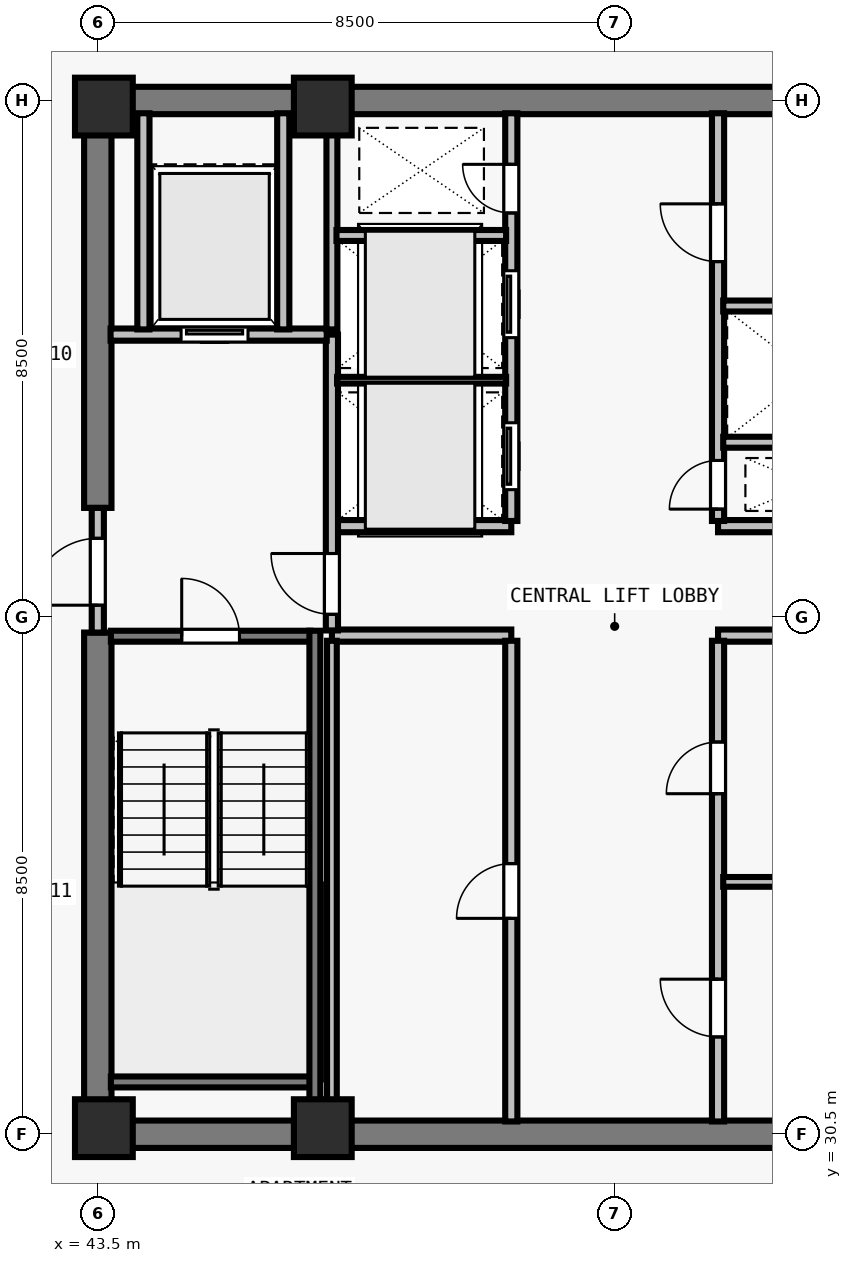
"""IFC4 building model, lengths in metres.
Left out: names, types, materials, properties, quantities, classifications, styles, units other than length and angle.
Written with IfcOpenShell. Run it as: python <this file> out.ifc"""

import sys

from ifc_helpers import new_model, si_unit, direction, frame, frame_2d, origin, origin_2d, place, context, subcontext, project, spatial, rectangle, extrude, element, fill, save


model = new_model("IFC4")
c1 = context("Model", 3, precision=1e-05, world=origin(), true_north=direction((0.0, 1.0)))
c2 = subcontext(c1, "Body", "Model", "MODEL_VIEW")
j1 = project(units=[si_unit("LENGTHUNIT", "METRE"), si_unit("PLANEANGLEUNIT", "RADIAN")], contexts=[c1])
p1 = place(None, origin())
s1 = spatial("IfcSite", under=j1, at=p1, CompositionType="ELEMENT")
p2 = place(p1, origin())
s2 = spatial("IfcBuilding", under=s1, at=p2, CompositionType="ELEMENT")
p3 = place(p2, frame((0.0, 0.0, 220.0)))
s3 = spatial("IfcBuildingStorey", under=s2, at=p3, CompositionType="ELEMENT", Elevation=220.0)
for number, where, z_axis, x_axis in (
    (1, (43.6, 30.6, 0.0), (0.0, 0.0, 1.0), (1.0, 0.0, 0.0)),
    (2, (47.2, 30.6, 0.0), (0.0, 0.0, 1.0), (1.0, 0.0, 0.0)),
    (3, (43.6, 47.4, 0.0), (0.0, 0.0, 1.0), (1.0, 0.0, 0.0)),
    (4, (47.2, 47.4, 0.0), (0.0, 0.0, 1.0), (1.0, 0.0, 0.0)),
):
    element("IfcColumn", number, at=place(p3, frame(where, z_axis=z_axis, x_axis=x_axis)), inside=s3, PredefinedType="COLUMN", context=c2, shape_type="SweptSolid", body=[
        extrude(rectangle(XDim=0.95, YDim=0.95, at=origin_2d()), origin(), (0.0, 0.0, 1.0), 3.5),
    ])
for number, where, z_axis, x_axis in (
    (5, (43.275, 30.5, 0.0), (0.0, 0.0, 1.0), (1.0, 0.0, 0.0)),
    (6, (43.275, 47.5, 0.0), (0.0, 0.0, 1.0), (1.0, 0.0, 0.0)),
):
    element("IfcWall", number, at=place(p3, frame(where, z_axis=z_axis, x_axis=x_axis)), inside=s3, PredefinedType="SHEAR", context=c2, shape_type="SweptSolid", body=[
        extrude(rectangle(XDim=17.45, YDim=0.45, at=frame_2d((8.725, 0.0))), origin(), (0.0, 0.0, 1.0), 3.29),
    ])
p4 = place(p3, frame((43.5, 30.715, 0.0), z_axis=(0.0, 0.0, 1.0), x_axis=(0.0, 1.0, 0.0)))
e7 = element("IfcWall", 7, at=p4, inside=s3, PredefinedType="SHEAR", context=c2, shape_type="SweptSolid", body=[
    extrude(rectangle(XDim=8.035, YDim=0.45, at=frame_2d((4.018, 0.0))), origin(), (0.0, 0.0, 1.0), 3.29),
])
p5 = place(p3, frame((43.5, 40.8, 0.0), z_axis=(0.0, 0.0, 1.0), x_axis=(0.0, 1.0, 0.0)))
e8 = element("IfcWall", 8, at=p5, inside=s3, PredefinedType="SHEAR", context=c2, shape_type="SweptSolid", body=[
    extrude(rectangle(XDim=6.485, YDim=0.45, at=frame_2d((3.242, 0.0))), origin(), (0.0, 0.0, 1.0), 3.29),
])
for number, where, z_axis, x_axis in (
    (9, (47.35, 38.7, 0.0), (0.0, 0.0, 1.0), (1.0, 0.0, 0.0)),
    (10, (47.35, 40.5, 0.0), (0.0, 0.0, 1.0), (1.0, 0.0, 0.0)),
    (11, (53.7, 38.7, 0.0), (0.0, 0.0, 1.0), (1.0, 0.0, 0.0)),
    (12, (53.7, 40.5, 0.0), (0.0, 0.0, 1.0), (1.0, 0.0, 0.0)),
):
    element("IfcWall", number, at=place(p3, frame(where, z_axis=z_axis, x_axis=x_axis)), inside=s3, PredefinedType="SOLIDWALL", context=c2, shape_type="SweptSolid", body=[
        extrude(rectangle(XDim=2.95, YDim=0.2, at=frame_2d((1.475, 0.0))), origin(), (0.0, 0.0, 1.0), 3.29),
    ])
p6 = place(p3, frame((50.3, 30.71, 0.0), z_axis=(0.0, 0.0, 1.0), x_axis=(0.0, 1.0, 0.0)))
e13 = element("IfcWall", 13, at=p6, inside=s3, PredefinedType="SOLIDWALL", context=c2, shape_type="SweptSolid", body=[
    extrude(rectangle(XDim=7.905, YDim=0.2, at=frame_2d((3.953, 0.0))), origin(), (0.0, 0.0, 1.0), 3.29),
])
p7 = place(p6, frame((3.34, 0.0, 0.0)))
e14 = element("IfcOpeningElement", 14, at=p7, cuts=e13, PredefinedType="OPENING", context=c2, shape_type="SweptSolid", body=[
    extrude(rectangle(XDim=0.9, YDim=2.12, at=frame_2d((0.45, 1.06))), frame((0.0, 0.11, 0.0), z_axis=(0.0, -1.0, 0.0), x_axis=(1.0, 0.0, 0.0)), (0.0, 0.0, 1.0), 0.22),
])
p8 = place(p3, frame((53.7, 30.71, 0.0), z_axis=(0.0, 0.0, 1.0), x_axis=(0.0, 1.0, 0.0)))
e15 = element("IfcWall", 15, at=p8, inside=s3, PredefinedType="SOLIDWALL", context=c2, shape_type="SweptSolid", body=[
    extrude(rectangle(XDim=7.905, YDim=0.2, at=frame_2d((3.953, 0.0))), origin(), (0.0, 0.0, 1.0), 3.29),
])
p9 = place(p8, frame((1.39, 0.0, 0.0)))
e16 = element("IfcOpeningElement", 16, at=p9, cuts=e15, PredefinedType="OPENING", context=c2, shape_type="SweptSolid", body=[
    extrude(rectangle(XDim=0.95, YDim=2.12, at=frame_2d((0.475, 1.06))), frame((0.0, 0.11, 0.0), z_axis=(0.0, -1.0, 0.0), x_axis=(1.0, 0.0, 0.0)), (0.0, 0.0, 1.0), 0.22),
])
p10 = place(p8, frame((5.39, 0.0, 0.0)))
e17 = element("IfcOpeningElement", 17, at=p10, cuts=e15, PredefinedType="OPENING", context=c2, shape_type="SweptSolid", body=[
    extrude(rectangle(XDim=0.85, YDim=2.12, at=frame_2d((0.425, 1.06))), frame((0.0, 0.11, 0.0), z_axis=(0.0, -1.0, 0.0), x_axis=(1.0, 0.0, 0.0)), (0.0, 0.0, 1.0), 0.22),
])
p11 = place(p3, frame((50.3, 40.585, 0.0), z_axis=(0.0, 0.0, 1.0), x_axis=(0.0, 1.0, 0.0)))
e18 = element("IfcWall", 18, at=p11, inside=s3, PredefinedType="SOLIDWALL", context=c2, shape_type="SweptSolid", body=[
    extrude(rectangle(XDim=6.705, YDim=0.2, at=frame_2d((3.353, 0.0))), origin(), (0.0, 0.0, 1.0), 3.29),
])
p12 = place(p11, frame((0.515, 0.0, 0.0)))
e19 = element("IfcOpeningElement", 19, at=p12, cuts=e18, PredefinedType="OPENING", context=c2, shape_type="SweptSolid", body=[
    extrude(rectangle(XDim=1.1, YDim=2.2, at=frame_2d((0.55, 1.1))), frame((0.0, 0.11, 0.0), z_axis=(0.0, -1.0, 0.0), x_axis=(1.0, 0.0, 0.0)), (0.0, 0.0, 1.0), 0.22),
])
p13 = place(p11, frame((3.015, 0.0, 0.0)))
e20 = element("IfcOpeningElement", 20, at=p13, cuts=e18, PredefinedType="OPENING", context=c2, shape_type="SweptSolid", body=[
    extrude(rectangle(XDim=1.1, YDim=2.2, at=frame_2d((0.55, 1.1))), frame((0.0, 0.11, 0.0), z_axis=(0.0, -1.0, 0.0), x_axis=(1.0, 0.0, 0.0)), (0.0, 0.0, 1.0), 0.22),
])
p14 = place(p11, frame((5.065, 0.0, 0.0)))
e21 = element("IfcOpeningElement", 21, at=p14, cuts=e18, PredefinedType="OPENING", context=c2, shape_type="SweptSolid", body=[
    extrude(rectangle(XDim=0.8, YDim=2.08, at=frame_2d((0.4, 1.04))), frame((0.0, 0.11, 0.0), z_axis=(0.0, -1.0, 0.0), x_axis=(1.0, 0.0, 0.0)), (0.0, 0.0, 1.0), 0.22),
])
p15 = place(p3, frame((53.7, 40.585, 0.0), z_axis=(0.0, 0.0, 1.0), x_axis=(0.0, 1.0, 0.0)))
e22 = element("IfcWall", 22, at=p15, inside=s3, PredefinedType="SOLIDWALL", context=c2, shape_type="SweptSolid", body=[
    extrude(rectangle(XDim=6.705, YDim=0.2, at=frame_2d((3.353, 0.0))), origin(), (0.0, 0.0, 1.0), 3.29),
])
p16 = place(p15, frame((0.195, 0.0, 0.0)))
e23 = element("IfcOpeningElement", 23, at=p16, cuts=e22, PredefinedType="OPENING", context=c2, shape_type="SweptSolid", body=[
    extrude(rectangle(XDim=0.8, YDim=2.08, at=frame_2d((0.4, 1.04))), frame((0.0, 0.11, 0.0), z_axis=(0.0, -1.0, 0.0), x_axis=(1.0, 0.0, 0.0)), (0.0, 0.0, 1.0), 0.22),
])
p17 = place(p15, frame((4.265, 0.0, 0.0)))
e24 = element("IfcOpeningElement", 24, at=p17, cuts=e22, PredefinedType="OPENING", context=c2, shape_type="SweptSolid", body=[
    extrude(rectangle(XDim=0.95, YDim=2.12, at=frame_2d((0.475, 1.06))), frame((0.0, 0.11, 0.0), z_axis=(0.0, -1.0, 0.0), x_axis=(1.0, 0.0, 0.0)), (0.0, 0.0, 1.0), 0.22),
])
p18 = place(p3, frame((43.5, 38.75, 0.0), z_axis=(0.0, 0.0, 1.0), x_axis=(0.0, 1.0, 0.0)))
e25 = element("IfcWall", 25, at=p18, inside=s3, PredefinedType="SOLIDWALL", context=c2, shape_type="SweptSolid", body=[
    extrude(rectangle(XDim=2.05, YDim=0.2, at=frame_2d((1.025, 0.0))), origin(), (0.0, 0.0, 1.0), 3.29),
])
p19 = place(p18, frame((0.45, 0.0, 0.0)))
e26 = element("IfcOpeningElement", 26, at=p19, cuts=e25, PredefinedType="OPENING", context=c2, shape_type="SweptSolid", body=[
    extrude(rectangle(XDim=1.1, YDim=2.15, at=frame_2d((0.55, 1.075))), frame((0.0, 0.11, 0.0), z_axis=(0.0, -1.0, 0.0), x_axis=(1.0, 0.0, 0.0)), (0.0, 0.0, 1.0), 0.22),
])
p20 = place(p3, frame((47.35, 38.785, 0.0), z_axis=(0.0, 0.0, 1.0), x_axis=(0.0, 1.0, 0.0)))
e27 = element("IfcWall", 27, at=p20, inside=s3, PredefinedType="SOLIDWALL", context=c2, shape_type="SweptSolid", body=[
    extrude(rectangle(XDim=4.865, YDim=0.2, at=frame_2d((2.433, 0.0))), origin(), (0.0, 0.0, 1.0), 3.29),
])
p21 = place(p20, frame((0.265, 0.0, 0.0)))
e28 = element("IfcOpeningElement", 28, at=p21, cuts=e27, PredefinedType="OPENING", context=c2, shape_type="SweptSolid", body=[
    extrude(rectangle(XDim=1.0, YDim=2.15, at=frame_2d((0.5, 1.075))), frame((0.0, 0.11, 0.0), z_axis=(0.0, -1.0, 0.0), x_axis=(1.0, 0.0, 0.0)), (0.0, 0.0, 1.0), 0.22),
])
p22 = place(p3, frame((43.71, 43.65, 0.0), z_axis=(0.0, 0.0, 1.0), x_axis=(1.0, 0.0, 0.0)))
e29 = element("IfcWall", 29, at=p22, inside=s3, PredefinedType="SOLIDWALL", context=c2, shape_type="SweptSolid", body=[
    extrude(rectangle(XDim=3.555, YDim=0.2, at=frame_2d((1.777, 0.0))), origin(), (0.0, 0.0, 1.0), 3.29),
])
p23 = place(p22, frame((1.16, 0.0, 0.0)))
e30 = element("IfcOpeningElement", 30, at=p23, cuts=e29, PredefinedType="OPENING", context=c2, shape_type="SweptSolid", body=[
    extrude(rectangle(XDim=1.1, YDim=2.2, at=frame_2d((0.55, 1.1))), frame((0.0, 0.11, 0.0), z_axis=(0.0, -1.0, 0.0), x_axis=(1.0, 0.0, 0.0)), (0.0, 0.0, 1.0), 0.22),
])
for number, where, z_axis, x_axis in (
    (31, (46.55, 43.735, 0.0), (0.0, 0.0, 1.0), (0.0, 1.0, 0.0)),
    (32, (44.25, 43.735, 0.0), (0.0, 0.0, 1.0), (0.0, 1.0, 0.0)),
):
    element("IfcWall", number, at=place(p3, frame(where, z_axis=z_axis, x_axis=x_axis)), inside=s3, PredefinedType="SOLIDWALL", context=c2, shape_type="SweptSolid", body=[
        extrude(rectangle(XDim=3.555, YDim=0.2, at=frame_2d((1.777, 0.0))), origin(), (0.0, 0.0, 1.0), 3.29),
    ])
p24 = place(p3, frame((47.35, 30.71, 0.0), z_axis=(0.0, 0.0, 1.0), x_axis=(0.0, 1.0, 0.0)))
e33 = element("IfcWall", 33, at=p24, inside=s3, PredefinedType="PARTITIONING", context=c2, shape_type="SweptSolid", body=[
    extrude(rectangle(XDim=7.905, YDim=0.16, at=frame_2d((3.953, 0.0))), origin(), (0.0, 0.0, 1.0), 3.29),
])
p25 = place(p3, frame((53.785, 34.65, 0.0), z_axis=(0.0, 0.0, 1.0), x_axis=(1.0, 0.0, 0.0)))
e34 = element("IfcWall", 34, at=p25, inside=s3, PredefinedType="PARTITIONING", context=c2, shape_type="SweptSolid", body=[
    extrude(rectangle(XDim=2.8, YDim=0.16, at=frame_2d((1.4, 0.0))), origin(), (0.0, 0.0, 1.0), 3.29),
])
p26 = place(p3, frame((47.35, 43.735, 0.0), z_axis=(0.0, 0.0, 1.0), x_axis=(0.0, 1.0, 0.0)))
e35 = element("IfcWall", 35, at=p26, inside=s3, PredefinedType="SOLIDWALL", context=c2, shape_type="SweptSolid", body=[
    extrude(rectangle(XDim=3.555, YDim=0.18, at=frame_2d((1.777, 0.0))), origin(), (0.0, 0.0, 1.0), 3.29),
])
p27 = place(p3, frame((47.435, 42.9, 0.0), z_axis=(0.0, 0.0, 1.0), x_axis=(1.0, 0.0, 0.0)))
e36 = element("IfcWall", 36, at=p27, inside=s3, PredefinedType="PARTITIONING", context=c2, shape_type="SweptSolid", body=[
    extrude(rectangle(XDim=2.78, YDim=0.11, at=frame_2d((1.39, 0.0))), origin(), (0.0, 0.0, 1.0), 3.29),
])
p28 = place(p3, frame((47.425, 45.28, 0.0), z_axis=(0.0, 0.0, 1.0), x_axis=(1.0, 0.0, 0.0)))
e37 = element("IfcWall", 37, at=p28, inside=s3, PredefinedType="SOLIDWALL", context=c2, shape_type="SweptSolid", body=[
    extrude(rectangle(XDim=2.79, YDim=0.18, at=frame_2d((1.395, 0.0))), origin(), (0.0, 0.0, 1.0), 3.29),
])
p29 = place(p3, frame((53.785, 41.88, 0.0), z_axis=(0.0, 0.0, 1.0), x_axis=(1.0, 0.0, 0.0)))
e38 = element("IfcWall", 38, at=p29, inside=s3, PredefinedType="SOLIDWALL", context=c2, shape_type="SweptSolid", body=[
    extrude(rectangle(XDim=2.78, YDim=0.18, at=frame_2d((1.39, 0.0))), origin(), (0.0, 0.0, 1.0), 3.29),
])
p30 = place(p3, frame((53.785, 44.12, 0.0), z_axis=(0.0, 0.0, 1.0), x_axis=(1.0, 0.0, 0.0)))
e39 = element("IfcWall", 39, at=p30, inside=s3, PredefinedType="SOLIDWALL", context=c2, shape_type="SweptSolid", body=[
    extrude(rectangle(XDim=2.79, YDim=0.18, at=frame_2d((1.395, 0.0))), origin(), (0.0, 0.0, 1.0), 3.29),
])
p31 = place(p3, frame((43.715, 38.69, 0.0), z_axis=(0.0, 0.0, 1.0), x_axis=(1.0, 0.0, 0.0)))
e40 = element("IfcWall", 40, at=p31, inside=s3, PredefinedType="SOLIDWALL", context=c2, shape_type="SweptSolid", body=[
    extrude(rectangle(XDim=3.28, YDim=0.18, at=frame_2d((1.64, 0.0))), origin(), (0.0, 0.0, 1.0), 3.29),
])
p32 = place(p31, frame((1.165, 0.0, 0.0)))
e41 = element("IfcOpeningElement", 41, at=p32, cuts=e40, PredefinedType="OPENING", context=c2, shape_type="SweptSolid", body=[
    extrude(rectangle(XDim=0.95, YDim=2.15, at=frame_2d((0.475, 1.075))), frame((0.0, 0.1, 0.0), z_axis=(0.0, -1.0, 0.0), x_axis=(1.0, 0.0, 0.0)), (0.0, 0.0, 1.0), 0.2),
])
p33 = place(p3, frame((43.715, 31.36, 0.0), z_axis=(0.0, 0.0, 1.0), x_axis=(1.0, 0.0, 0.0)))
e42 = element("IfcWall", 42, at=p33, inside=s3, PredefinedType="SOLIDWALL", context=c2, shape_type="SweptSolid", body=[
    extrude(rectangle(XDim=3.28, YDim=0.18, at=frame_2d((1.64, 0.0))), origin(), (0.0, 0.0, 1.0), 3.29),
])
p34 = place(p3, frame((47.07, 38.78, 0.0), z_axis=(0.0, 0.0, 1.0), x_axis=(0.0, -1.0, 0.0)))
e43 = element("IfcWall", 43, at=p34, inside=s3, PredefinedType="SOLIDWALL", context=c2, shape_type="SweptSolid", body=[
    extrude(rectangle(XDim=8.067, YDim=0.18, at=frame_2d((4.034, 0.0))), origin(), (0.0, 0.0, 1.0), 3.29),
])
p35 = place(p19, origin())
e44 = element("IfcDoor", 44, at=p35, inside=s3, OperationType="SINGLE_SWING_LEFT", PredefinedType="DOOR", context=c2, shape_type="SweptSolid", body=[
    extrude(rectangle(XDim=1.1, YDim=2.15, at=frame_2d((0.55, 1.075))), frame((0.0, 0.025, 0.0), z_axis=(0.0, -1.0, 0.0), x_axis=(1.0, 0.0, 0.0)), (0.0, 0.0, 1.0), 0.05),
])
fill(e26, e44)
p36 = place(p21, origin())
e45 = element("IfcDoor", 45, at=p36, inside=s3, OperationType="SINGLE_SWING_RIGHT", PredefinedType="DOOR", context=c2, shape_type="SweptSolid", body=[
    extrude(rectangle(XDim=1.0, YDim=2.15, at=frame_2d((0.5, 1.075))), frame((0.0, 0.025, 0.0), z_axis=(0.0, -1.0, 0.0), x_axis=(1.0, 0.0, 0.0)), (0.0, 0.0, 1.0), 0.05),
])
fill(e28, e45)
p37 = place(p23, origin())
e46 = element("IfcDoor", 46, at=p37, inside=s3, OperationType="SLIDING_TO_LEFT", PredefinedType="DOOR", context=c2, shape_type="SweptSolid", body=[
    extrude(rectangle(XDim=1.1, YDim=2.2, at=frame_2d((0.55, 1.1))), frame((0.0, 0.025, 0.0), z_axis=(0.0, -1.0, 0.0), x_axis=(1.0, 0.0, 0.0)), (0.0, 0.0, 1.0), 0.05),
])
fill(e30, e46)
p38 = place(p7, origin())
e47 = element("IfcDoor", 47, at=p38, inside=s3, OperationType="SINGLE_SWING_LEFT", PredefinedType="DOOR", context=c2, shape_type="SweptSolid", body=[
    extrude(rectangle(XDim=0.9, YDim=2.12, at=frame_2d((0.45, 1.06))), frame((0.0, 0.025, 0.0), z_axis=(0.0, -1.0, 0.0), x_axis=(1.0, 0.0, 0.0)), (0.0, 0.0, 1.0), 0.05),
])
fill(e14, e47)
p39 = place(p9, origin())
e48 = element("IfcDoor", 48, at=p39, inside=s3, OperationType="SINGLE_SWING_RIGHT", PredefinedType="DOOR", context=c2, shape_type="SweptSolid", body=[
    extrude(rectangle(XDim=0.95, YDim=2.12, at=frame_2d((0.475, 1.06))), frame((0.0, 0.025, 0.0), z_axis=(0.0, -1.0, 0.0), x_axis=(1.0, 0.0, 0.0)), (0.0, 0.0, 1.0), 0.05),
])
fill(e16, e48)
p40 = place(p10, origin())
e49 = element("IfcDoor", 49, at=p40, inside=s3, OperationType="SINGLE_SWING_LEFT", PredefinedType="DOOR", context=c2, shape_type="SweptSolid", body=[
    extrude(rectangle(XDim=0.85, YDim=2.12, at=frame_2d((0.425, 1.06))), frame((0.0, 0.025, 0.0), z_axis=(0.0, -1.0, 0.0), x_axis=(1.0, 0.0, 0.0)), (0.0, 0.0, 1.0), 0.05),
])
fill(e17, e49)
p41 = place(p12, origin())
e50 = element("IfcDoor", 50, at=p41, inside=s3, OperationType="SLIDING_TO_LEFT", PredefinedType="DOOR", context=c2, shape_type="SweptSolid", body=[
    extrude(rectangle(XDim=1.1, YDim=2.2, at=frame_2d((0.55, 1.1))), frame((0.0, 0.025, 0.0), z_axis=(0.0, -1.0, 0.0), x_axis=(1.0, 0.0, 0.0)), (0.0, 0.0, 1.0), 0.05),
])
fill(e19, e50)
p42 = place(p13, origin())
e51 = element("IfcDoor", 51, at=p42, inside=s3, OperationType="SLIDING_TO_LEFT", PredefinedType="DOOR", context=c2, shape_type="SweptSolid", body=[
    extrude(rectangle(XDim=1.1, YDim=2.2, at=frame_2d((0.55, 1.1))), frame((0.0, 0.025, 0.0), z_axis=(0.0, -1.0, 0.0), x_axis=(1.0, 0.0, 0.0)), (0.0, 0.0, 1.0), 0.05),
])
fill(e20, e51)
p43 = place(p14, origin())
e52 = element("IfcDoor", 52, at=p43, inside=s3, OperationType="SINGLE_SWING_RIGHT", PredefinedType="DOOR", context=c2, shape_type="SweptSolid", body=[
    extrude(rectangle(XDim=0.8, YDim=2.08, at=frame_2d((0.4, 1.04))), frame((0.0, 0.025, 0.0), z_axis=(0.0, -1.0, 0.0), x_axis=(1.0, 0.0, 0.0)), (0.0, 0.0, 1.0), 0.05),
])
fill(e21, e52)
p44 = place(p16, origin())
e53 = element("IfcDoor", 53, at=p44, inside=s3, OperationType="SINGLE_SWING_LEFT", PredefinedType="DOOR", context=c2, shape_type="SweptSolid", body=[
    extrude(rectangle(XDim=0.8, YDim=2.08, at=frame_2d((0.4, 1.04))), frame((0.0, 0.025, 0.0), z_axis=(0.0, -1.0, 0.0), x_axis=(1.0, 0.0, 0.0)), (0.0, 0.0, 1.0), 0.05),
])
fill(e23, e53)
p45 = place(p17, origin())
e54 = element("IfcDoor", 54, at=p45, inside=s3, OperationType="SINGLE_SWING_RIGHT", PredefinedType="DOOR", context=c2, shape_type="SweptSolid", body=[
    extrude(rectangle(XDim=0.95, YDim=2.12, at=frame_2d((0.475, 1.06))), frame((0.0, 0.025, 0.0), z_axis=(0.0, -1.0, 0.0), x_axis=(1.0, 0.0, 0.0)), (0.0, 0.0, 1.0), 0.05),
])
fill(e24, e54)
p46 = place(p32, origin())
e55 = element("IfcDoor", 55, at=p46, inside=s3, OperationType="SINGLE_SWING_LEFT", PredefinedType="DOOR", context=c2, shape_type="SweptSolid", body=[
    extrude(rectangle(XDim=0.95, YDim=2.15, at=frame_2d((0.475, 1.075))), frame((0.0, 0.025, 0.0), z_axis=(0.0, -1.0, 0.0), x_axis=(1.0, 0.0, 0.0)), (0.0, 0.0, 1.0), 0.05),
])
fill(e41, e55)
save(model, sys.argv[1])
